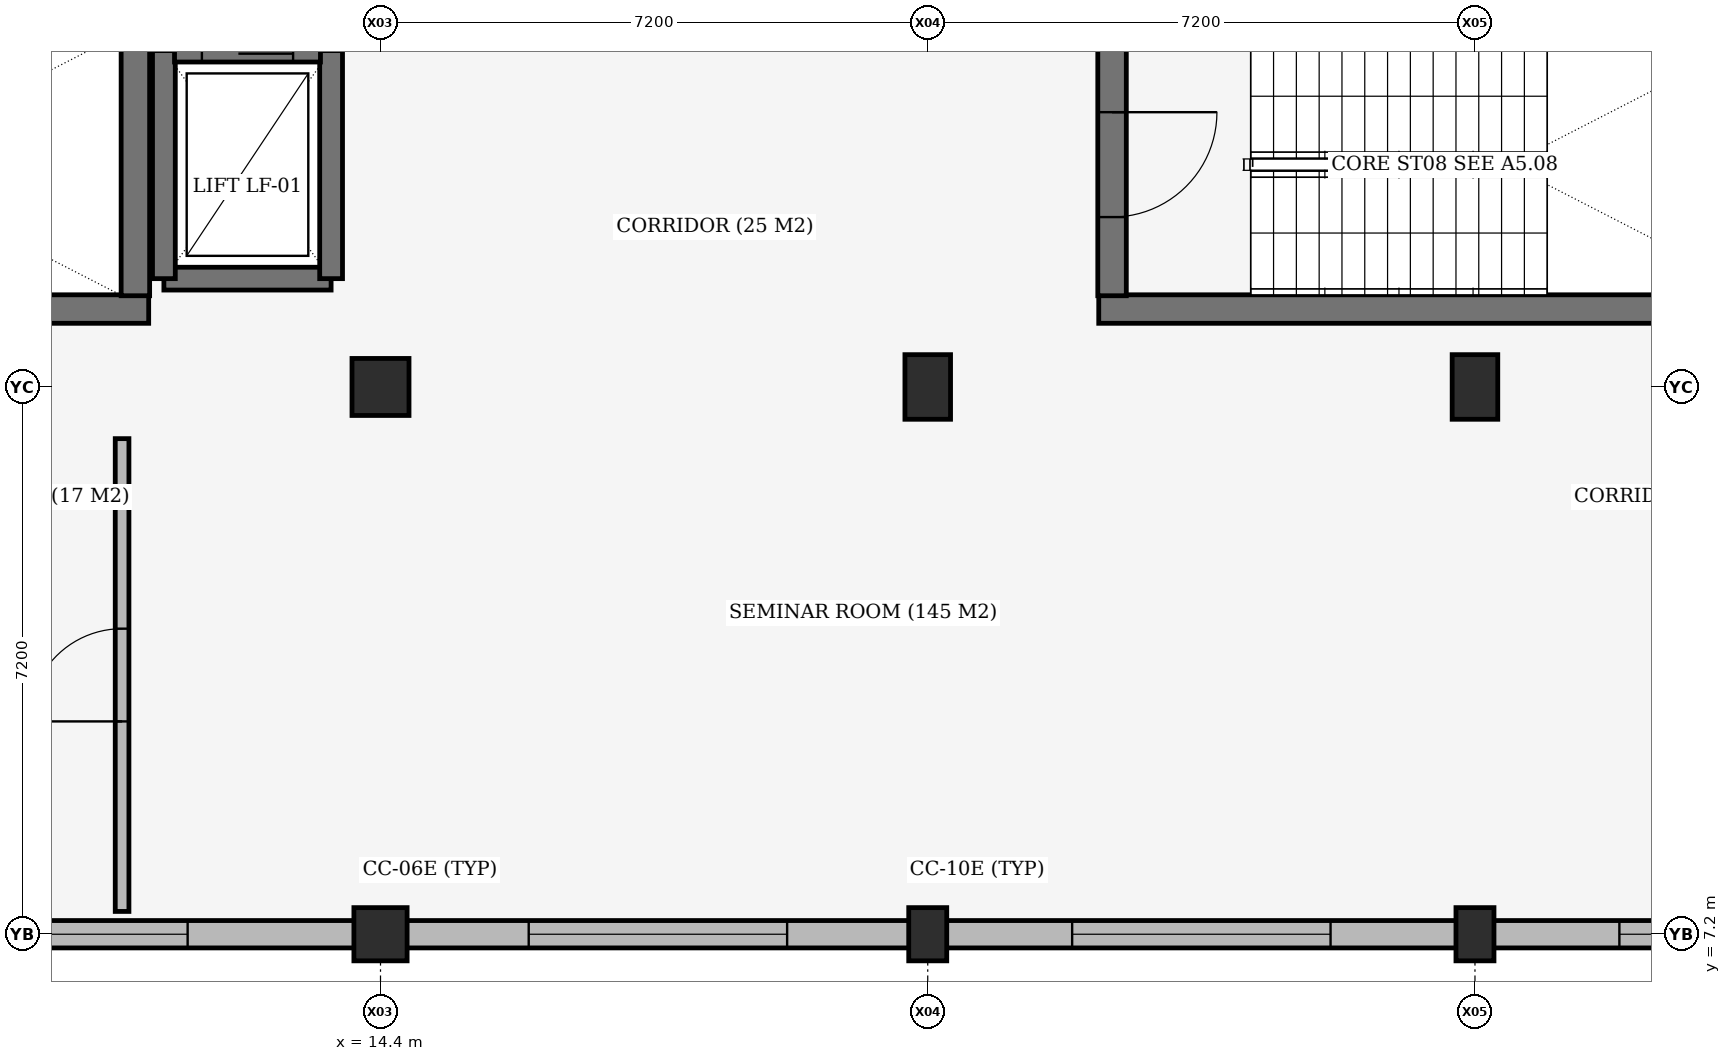
"""IFC4 building model, lengths in metres.
Left out: names, types, materials, properties, quantities, classifications, styles, units other than length and angle.
Written with IfcOpenShell. Run it as: python <this file> out.ifc"""

import sys

from ifc_helpers import new_model, si_unit, direction, frame, frame_2d, origin, origin_2d, place, context, subcontext, project, spatial, rectangle, extrude, element, fill, save


model = new_model("IFC4")
c1 = context("Model", 3, precision=1e-05, world=origin(), true_north=direction((0.0, 1.0)))
c2 = subcontext(c1, "Body", "Model", "MODEL_VIEW")
j1 = project(units=[si_unit("LENGTHUNIT", "METRE"), si_unit("PLANEANGLEUNIT", "RADIAN")], contexts=[c1])
p1 = place(None, origin())
s1 = spatial("IfcSite", under=j1, at=p1, CompositionType="ELEMENT")
p2 = place(p1, origin())
s2 = spatial("IfcBuilding", under=s1, at=p2, CompositionType="ELEMENT")
p3 = place(p2, frame((0.0, 0.0, 5.4)))
s3 = spatial("IfcBuildingStorey", under=s2, at=p3, CompositionType="ELEMENT", Elevation=5.4)
p4 = place(p3, frame((14.4, 7.2, 0.0), z_axis=(0.0, 0.0, 1.0), x_axis=(1.0, 0.0, 0.0)))
e1 = element("IfcColumn", 1, at=p4, inside=s3, PredefinedType="COLUMN", context=c2, shape_type="SweptSolid", body=[
    extrude(rectangle(XDim=0.7, YDim=0.7, at=origin_2d()), origin(), (0.0, 0.0, 1.0), 3.89),
])
p5 = place(p3, frame((14.4, 14.4, 0.0), z_axis=(0.0, 0.0, 1.0), x_axis=(1.0, 0.0, 0.0)))
e2 = element("IfcColumn", 2, at=p5, inside=s3, PredefinedType="COLUMN", context=c2, shape_type="SweptSolid", body=[
    extrude(rectangle(XDim=0.75, YDim=0.75, at=origin_2d()), origin(), (0.0, 0.0, 1.0), 3.89),
])
p6 = place(p3, frame((21.6, 7.2, 0.0), z_axis=(0.0, 0.0, 1.0), x_axis=(1.0, 0.0, 0.0)))
e3 = element("IfcColumn", 3, at=p6, inside=s3, PredefinedType="COLUMN", context=c2, shape_type="SweptSolid", body=[
    extrude(rectangle(XDim=0.5, YDim=0.7, at=origin_2d()), origin(), (0.0, 0.0, 1.0), 3.89),
])
p7 = place(p3, frame((21.6, 14.4, 0.0), z_axis=(0.0, 0.0, 1.0), x_axis=(1.0, 0.0, 0.0)))
e4 = element("IfcColumn", 4, at=p7, inside=s3, PredefinedType="COLUMN", context=c2, shape_type="SweptSolid", body=[
    extrude(rectangle(XDim=0.6, YDim=0.85, at=origin_2d()), origin(), (0.0, 0.0, 1.0), 3.89),
])
p8 = place(p3, frame((28.8, 7.2, 0.0), z_axis=(0.0, 0.0, 1.0), x_axis=(1.0, 0.0, 0.0)))
e5 = element("IfcColumn", 5, at=p8, inside=s3, PredefinedType="COLUMN", context=c2, shape_type="SweptSolid", body=[
    extrude(rectangle(XDim=0.5, YDim=0.7, at=origin_2d()), origin(), (0.0, 0.0, 1.0), 3.89),
])
p9 = place(p3, frame((28.8, 14.4, 0.0), z_axis=(0.0, 0.0, 1.0), x_axis=(1.0, 0.0, 0.0)))
e6 = element("IfcColumn", 6, at=p9, inside=s3, PredefinedType="COLUMN", context=c2, shape_type="SweptSolid", body=[
    extrude(rectangle(XDim=0.6, YDim=0.85, at=origin_2d()), origin(), (0.0, 0.0, 1.0), 3.89),
])
p10 = place(p3, frame((2.25, 15.425, 0.0), z_axis=(0.0, 0.0, 1.0), x_axis=(1.0, 0.0, 0.0)))
e7 = element("IfcWall", 7, at=p10, inside=s3, PredefinedType="SHEAR", context=c2, shape_type="SweptSolid", body=[
    extrude(rectangle(XDim=9.1, YDim=0.375, at=frame_2d((4.55, 0.0))), origin(), (0.0, 0.0, 1.0), 3.89),
])
p11 = place(p3, frame((11.175, 15.6, 0.0), z_axis=(0.0, 0.0, 1.0), x_axis=(0.0, 1.0, 0.0)))
e8 = element("IfcWall", 8, at=p11, inside=s3, PredefinedType="SHEAR", context=c2, shape_type="SweptSolid", body=[
    extrude(rectangle(XDim=3.45, YDim=0.375, at=frame_2d((1.725, 0.0))), origin(), (0.0, 0.0, 1.0), 3.89),
])
p12 = place(p3, frame((23.85, 15.425, 0.0), z_axis=(0.0, 0.0, 1.0), x_axis=(1.0, 0.0, 0.0)))
e9 = element("IfcWall", 9, at=p12, inside=s3, PredefinedType="SHEAR", context=c2, shape_type="SweptSolid", body=[
    extrude(rectangle(XDim=9.1, YDim=0.375, at=frame_2d((4.55, 0.0))), origin(), (0.0, 0.0, 1.0), 3.89),
])
p13 = place(p3, frame((11.55, 15.825, 0.0), z_axis=(0.0, 0.0, 1.0), x_axis=(1.0, 0.0, 0.0)))
e10 = element("IfcWall", 10, at=p13, inside=s3, PredefinedType="SHEAR", context=c2, shape_type="SweptSolid", body=[
    extrude(rectangle(XDim=2.2, YDim=0.3, at=frame_2d((1.1, 0.0))), origin(), (0.0, 0.0, 1.0), 3.89),
])
for number, where, z_axis, x_axis in (
    (11, (11.55, 18.825, 0.0), (0.0, 0.0, 1.0), (0.0, -1.0, 0.0)),
    (12, (13.75, 15.825, 0.0), (0.0, 0.0, 1.0), (0.0, 1.0, 0.0)),
):
    element("IfcWall", number, at=place(p3, frame(where, z_axis=z_axis, x_axis=x_axis)), inside=s3, PredefinedType="SHEAR", context=c2, shape_type="SweptSolid", body=[
        extrude(rectangle(XDim=3.0, YDim=0.3, at=frame_2d((1.5, 0.0))), origin(), (0.0, 0.0, 1.0), 3.89),
    ])
p14 = place(p3, frame((14.058, 7.2, 0.0), z_axis=(0.0, 0.0, 1.0), x_axis=(-1.0, 0.0, 0.0)))
e13 = element("IfcWall", 13, at=p14, inside=s3, PredefinedType="STANDARD", context=c2, shape_type="SweptSolid", body=[
    extrude(rectangle(XDim=6.591, YDim=0.36, at=frame_2d((3.295, 0.0))), origin(), (0.0, 0.0, 1.0), 3.37),
])
p15 = place(p14, frame((2.196, 0.0, 0.9)))
e14 = element("IfcOpeningElement", 14, at=p15, cuts=e13, PredefinedType="OPENING", context=c2, shape_type="SweptSolid", body=[
    extrude(rectangle(XDim=2.2, YDim=2.2, at=frame_2d((1.1, 1.1))), frame((0.0, 0.19, 0.0), z_axis=(0.0, -1.0, 0.0), x_axis=(1.0, 0.0, 0.0)), (0.0, 0.0, 1.0), 0.38),
])
p16 = place(p3, frame((21.358, 7.2, 0.0), z_axis=(0.0, 0.0, 1.0), x_axis=(-1.0, 0.0, 0.0)))
e15 = element("IfcWall", 15, at=p16, inside=s3, PredefinedType="STANDARD", context=c2, shape_type="SweptSolid", body=[
    extrude(rectangle(XDim=6.616, YDim=0.36, at=frame_2d((3.308, 0.0))), origin(), (0.0, 0.0, 1.0), 3.31),
])
p17 = place(p16, frame((1.608, 0.0, 0.9)))
e16 = element("IfcOpeningElement", 16, at=p17, cuts=e15, PredefinedType="OPENING", context=c2, shape_type="SweptSolid", body=[
    extrude(rectangle(XDim=3.4, YDim=1.5, at=frame_2d((1.7, 0.75))), frame((0.0, 0.19, 0.0), z_axis=(0.0, -1.0, 0.0), x_axis=(1.0, 0.0, 0.0)), (0.0, 0.0, 1.0), 0.38),
])
p18 = place(p3, frame((28.558, 7.2, 0.0), z_axis=(0.0, 0.0, 1.0), x_axis=(-1.0, 0.0, 0.0)))
e17 = element("IfcWall", 17, at=p18, inside=s3, PredefinedType="STANDARD", context=c2, shape_type="SweptSolid", body=[
    extrude(rectangle(XDim=6.716, YDim=0.36, at=frame_2d((3.358, 0.0))), origin(), (0.0, 0.0, 1.0), 3.25),
])
p19 = place(p18, frame((1.658, 0.0, 0.9)))
e18 = element("IfcOpeningElement", 18, at=p19, cuts=e17, PredefinedType="OPENING", context=c2, shape_type="SweptSolid", body=[
    extrude(rectangle(XDim=3.4, YDim=1.5, at=frame_2d((1.7, 0.75))), frame((0.0, 0.19, 0.0), z_axis=(0.0, -1.0, 0.0), x_axis=(1.0, 0.0, 0.0)), (0.0, 0.0, 1.0), 0.38),
])
p20 = place(p3, frame((35.758, 7.2, 0.0), z_axis=(0.0, 0.0, 1.0), x_axis=(-1.0, 0.0, 0.0)))
e19 = element("IfcWall", 19, at=p20, inside=s3, PredefinedType="STANDARD", context=c2, shape_type="SweptSolid", body=[
    extrude(rectangle(XDim=6.716, YDim=0.36, at=frame_2d((3.358, 0.0))), origin(), (0.0, 0.0, 1.0), 3.21),
])
p21 = place(p20, frame((1.658, 0.0, 0.9)))
e20 = element("IfcOpeningElement", 20, at=p21, cuts=e19, PredefinedType="OPENING", context=c2, shape_type="SweptSolid", body=[
    extrude(rectangle(XDim=3.4, YDim=1.5, at=frame_2d((1.7, 0.75))), frame((0.0, 0.19, 0.0), z_axis=(0.0, -1.0, 0.0), x_axis=(1.0, 0.0, 0.0)), (0.0, 0.0, 1.0), 0.38),
])
p22 = place(p3, frame((24.025, 19.05, 0.0), z_axis=(0.0, 0.0, 1.0), x_axis=(0.0, -1.0, 0.0)))
e21 = element("IfcWall", 21, at=p22, inside=s3, PredefinedType="SHEAR", context=c2, shape_type="SweptSolid", body=[
    extrude(rectangle(XDim=3.45, YDim=0.375, at=frame_2d((1.725, 0.0))), origin(), (0.0, 0.0, 1.0), 3.89),
])
p23 = place(p22, frame((1.035, 0.0, 0.0)))
e22 = element("IfcOpeningElement", 22, at=p23, cuts=e21, PredefinedType="OPENING", context=c2, shape_type="SweptSolid", body=[
    extrude(rectangle(XDim=1.38, YDim=2.2, at=frame_2d((0.69, 1.1))), frame((0.0, 0.198, 0.0), z_axis=(0.0, -1.0, 0.0), x_axis=(1.0, 0.0, 0.0)), (0.0, 0.0, 1.0), 0.395),
])
p24 = place(p3, frame((11.69, 18.825, 0.0), z_axis=(0.0, 0.0, 1.0), x_axis=(1.0, 0.0, 0.0)))
e23 = element("IfcWall", 23, at=p24, inside=s3, PredefinedType="SHEAR", context=c2, shape_type="SweptSolid", body=[
    extrude(rectangle(XDim=1.92, YDim=0.3, at=frame_2d((0.96, 0.0))), origin(), (0.0, 0.0, 1.0), 3.89),
])
p25 = place(p24, frame((0.36, 0.0, 0.0)))
e24 = element("IfcOpeningElement", 24, at=p25, cuts=e23, PredefinedType="OPENING", context=c2, shape_type="SweptSolid", body=[
    extrude(rectangle(XDim=1.2, YDim=2.1, at=frame_2d((0.6, 1.05))), frame((0.0, 0.16, 0.0), z_axis=(0.0, -1.0, 0.0), x_axis=(1.0, 0.0, 0.0)), (0.0, 0.0, 1.0), 0.32),
])
p26 = place(p3, frame((11.0, 7.5, 0.0), z_axis=(0.0, 0.0, 1.0), x_axis=(0.0, 1.0, 0.0)))
e25 = element("IfcWall", 25, at=p26, inside=s3, PredefinedType="PARTITIONING", context=c2, shape_type="SweptSolid", body=[
    extrude(rectangle(XDim=6.22, YDim=0.18, at=frame_2d((3.11, 0.0))), origin(), (0.0, 0.0, 1.0), 3.89),
])
p27 = place(p26, frame((2.5, 0.0, 0.0)))
e26 = element("IfcOpeningElement", 26, at=p27, cuts=e25, PredefinedType="OPENING", context=c2, shape_type="SweptSolid", body=[
    extrude(rectangle(XDim=1.22, YDim=2.25, at=frame_2d((0.61, 1.125))), frame((0.0, 0.1, 0.0), z_axis=(0.0, -1.0, 0.0), x_axis=(1.0, 0.0, 0.0)), (0.0, 0.0, 1.0), 0.2),
])
p28 = place(p15, origin())
e27 = element("IfcWindow", 27, at=p28, inside=s3, PartitioningType="DOUBLE_PANEL_VERTICAL", PredefinedType="WINDOW", context=c2, shape_type="SweptSolid", body=[
    extrude(rectangle(XDim=2.2, YDim=2.2, at=frame_2d((1.1, 1.1))), frame((0.0, 0.03, 0.0), z_axis=(0.0, -1.0, 0.0), x_axis=(1.0, 0.0, 0.0)), (0.0, 0.0, 1.0), 0.06),
])
fill(e14, e27)
p29 = place(p17, origin())
e28 = element("IfcWindow", 28, at=p29, inside=s3, PartitioningType="DOUBLE_PANEL_VERTICAL", PredefinedType="WINDOW", context=c2, shape_type="SweptSolid", body=[
    extrude(rectangle(XDim=3.4, YDim=1.5, at=frame_2d((1.7, 0.75))), frame((0.0, 0.03, 0.0), z_axis=(0.0, -1.0, 0.0), x_axis=(1.0, 0.0, 0.0)), (0.0, 0.0, 1.0), 0.06),
])
fill(e16, e28)
p30 = place(p19, origin())
e29 = element("IfcWindow", 29, at=p30, inside=s3, PartitioningType="DOUBLE_PANEL_VERTICAL", PredefinedType="WINDOW", context=c2, shape_type="SweptSolid", body=[
    extrude(rectangle(XDim=3.4, YDim=1.5, at=frame_2d((1.7, 0.75))), frame((0.0, 0.03, 0.0), z_axis=(0.0, -1.0, 0.0), x_axis=(1.0, 0.0, 0.0)), (0.0, 0.0, 1.0), 0.06),
])
fill(e18, e29)
p31 = place(p21, origin())
e30 = element("IfcWindow", 30, at=p31, inside=s3, PartitioningType="DOUBLE_PANEL_VERTICAL", PredefinedType="WINDOW", context=c2, shape_type="SweptSolid", body=[
    extrude(rectangle(XDim=3.4, YDim=1.5, at=frame_2d((1.7, 0.75))), frame((0.0, 0.03, 0.0), z_axis=(0.0, -1.0, 0.0), x_axis=(1.0, 0.0, 0.0)), (0.0, 0.0, 1.0), 0.06),
])
fill(e20, e30)
p32 = place(p23, origin())
e31 = element("IfcDoor", 31, at=p32, inside=s3, OperationType="DOUBLE_DOOR_SINGLE_SWING", PredefinedType="DOOR", context=c2, shape_type="SweptSolid", body=[
    extrude(rectangle(XDim=1.38, YDim=2.2, at=frame_2d((0.69, 1.1))), frame((0.0, 0.025, 0.0), z_axis=(0.0, -1.0, 0.0), x_axis=(1.0, 0.0, 0.0)), (0.0, 0.0, 1.0), 0.05),
])
fill(e22, e31)
p33 = place(p25, origin())
e32 = element("IfcDoor", 32, at=p33, inside=s3, OperationType="SLIDING_TO_LEFT", PredefinedType="DOOR", context=c2, shape_type="SweptSolid", body=[
    extrude(rectangle(XDim=1.2, YDim=2.1, at=frame_2d((0.6, 1.05))), frame((0.0, 0.025, 0.0), z_axis=(0.0, -1.0, 0.0), x_axis=(1.0, 0.0, 0.0)), (0.0, 0.0, 1.0), 0.05),
])
fill(e24, e32)
p34 = place(p27, origin())
e33 = element("IfcDoor", 33, at=p34, inside=s3, OperationType="SINGLE_SWING_LEFT", PredefinedType="DOOR", context=c2, shape_type="SweptSolid", body=[
    extrude(rectangle(XDim=1.22, YDim=2.25, at=frame_2d((0.61, 1.125))), frame((0.0, 0.025, 0.0), z_axis=(0.0, -1.0, 0.0), x_axis=(1.0, 0.0, 0.0)), (0.0, 0.0, 1.0), 0.05),
])
fill(e26, e33)
save(model, sys.argv[1])
